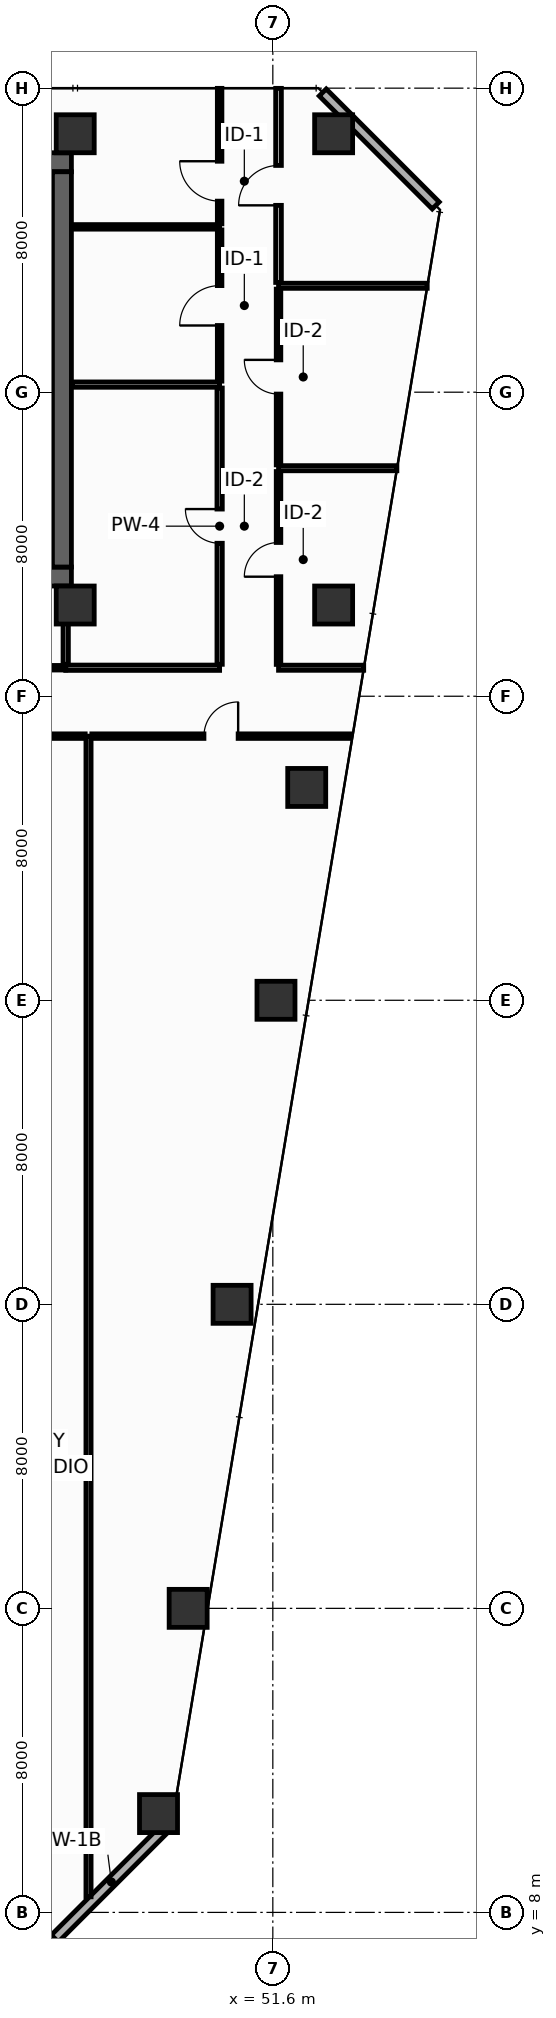
"""IFC4 building model, lengths in metres.
Left out: names, types, materials, properties, quantities, classifications, styles, units other than length and angle.
Written with IfcOpenShell. Run it as: python <this file> out.ifc"""

import sys

from ifc_helpers import new_model, si_unit, direction, frame, frame_2d, origin, origin_2d, place, context, subcontext, project, spatial, rectangle, hollow_rectangle, extrude, element, fill, save


model = new_model("IFC4")
c1 = context("Model", 3, precision=1e-05, world=origin(), true_north=direction((0.0, 1.0)))
c2 = subcontext(c1, "Body", "Model", "MODEL_VIEW")
j1 = project(units=[si_unit("LENGTHUNIT", "METRE"), si_unit("PLANEANGLEUNIT", "RADIAN")], contexts=[c1])
p1 = place(None, origin())
s1 = spatial("IfcSite", under=j1, at=p1, CompositionType="ELEMENT")
p2 = place(p1, origin())
s2 = spatial("IfcBuilding", under=s1, at=p2, CompositionType="ELEMENT")
p3 = place(p2, frame((0.0, 0.0, 137.2)))
s3 = spatial("IfcBuildingStorey", under=s2, at=p3, CompositionType="ELEMENT", Elevation=137.2)
p4 = place(p3, frame((13.6, 43.15, 0.0), z_axis=(0.0, 0.0, 1.0), x_axis=(1.0, 0.0, 0.0)))
e1 = element("IfcWall", 1, at=p4, inside=s3, PredefinedType="SHEAR", context=c2, shape_type="SweptSolid", body=[
    extrude(rectangle(XDim=32.7, YDim=0.5, at=frame_2d((16.35, 0.0))), origin(), (0.0, 0.0, 1.0), 3.55),
])
p5 = place(p4, frame((5.4, 0.0, 0.0)))
e2 = element("IfcOpeningElement", 2, at=p5, cuts=e1, PredefinedType="OPENING", context=c2, shape_type="SweptSolid", body=[
    extrude(rectangle(XDim=1.1, YDim=2.15, at=frame_2d((0.55, 1.075))), frame((0.0, 0.26, 0.0), z_axis=(0.0, -1.0, 0.0), x_axis=(1.0, 0.0, 0.0)), (0.0, 0.0, 1.0), 0.52),
])
p6 = place(p4, frame((25.6, 0.0, 0.0)))
e3 = element("IfcOpeningElement", 3, at=p6, cuts=e1, PredefinedType="OPENING", context=c2, shape_type="SweptSolid", body=[
    extrude(rectangle(XDim=1.1, YDim=2.15, at=frame_2d((0.55, 1.075))), frame((0.0, 0.26, 0.0), z_axis=(0.0, -1.0, 0.0), x_axis=(1.0, 0.0, 0.0)), (0.0, 0.0, 1.0), 0.52),
])
p7 = place(p3, frame((13.6, 54.05, 0.0), z_axis=(0.0, 0.0, 1.0), x_axis=(1.0, 0.0, 0.0)))
e4 = element("IfcWall", 4, at=p7, inside=s3, PredefinedType="SHEAR", context=c2, shape_type="SweptSolid", body=[
    extrude(rectangle(XDim=32.7, YDim=0.5, at=frame_2d((16.35, 0.0))), origin(), (0.0, 0.0, 1.0), 3.55),
])
p8 = place(p3, frame((46.05, 43.4, 0.0), z_axis=(0.0, 0.0, 1.0), x_axis=(0.0, 1.0, 0.0)))
e5 = element("IfcWall", 5, at=p8, inside=s3, PredefinedType="SHEAR", context=c2, shape_type="SweptSolid", body=[
    extrude(rectangle(XDim=10.4, YDim=0.5, at=frame_2d((5.2, 0.0))), origin(), (0.0, 0.0, 1.0), 3.55),
])
for number, where, z_axis, x_axis in (
    (6, (46.4, 54.8, 0.0), (0.0, 0.0, 1.0), (1.0, 0.0, 0.0)),
    (7, (53.2, 54.8, 0.0), (0.0, 0.0, 1.0), (1.0, 0.0, 0.0)),
    (8, (46.4, 42.4, 0.0), (0.0, 0.0, 1.0), (1.0, 0.0, 0.0)),
    (9, (53.2, 42.4, 0.0), (0.0, 0.0, 1.0), (1.0, 0.0, 0.0)),
    (10, (48.592, 10.6, 0.0), (0.0, 0.0, 1.0), (1.0, 0.0, 0.0)),
    (11, (49.372, 16.0, 0.0), (0.0, 0.0, 1.0), (1.0, 0.0, 0.0)),
    (12, (50.528, 24.0, 0.0), (0.0, 0.0, 1.0), (1.0, 0.0, 0.0)),
    (13, (51.683, 32.0, 0.0), (0.0, 0.0, 1.0), (1.0, 0.0, 0.0)),
    (14, (52.492, 37.6, 0.0), (0.0, 0.0, 1.0), (1.0, 0.0, 0.0)),
):
    element("IfcColumn", number, at=place(p3, frame(where, z_axis=z_axis, x_axis=x_axis)), inside=s3, PredefinedType="COLUMN", context=c2, shape_type="SweptSolid", body=[
        extrude(hollow_rectangle(XDim=1.0, YDim=1.0, WallThickness=0.045, at=origin_2d()), origin(), (0.0, 0.0, 1.0), 3.8),
    ])
p9 = place(p3, frame((45.864, 7.313, 0.0), z_axis=(0.0, 0.0, 1.0), x_axis=(0.70707775441, 0.707135806771, 0.0)))
e15 = element("IfcWall", 15, at=p9, inside=s3, PredefinedType="STANDARD", context=c2, shape_type="SweptSolid", body=[
    extrude(rectangle(XDim=4.206, YDim=0.26, at=frame_2d((2.103, 0.0))), origin(), (0.0, 0.0, 1.0), 3.55),
])
p10 = place(p3, frame((55.887, 52.913, 0.0), z_axis=(0.0, 0.0, 1.0), x_axis=(-0.707106781187, 0.707106781187, 0.0)))
e16 = element("IfcWall", 16, at=p10, inside=s3, PredefinedType="STANDARD", context=c2, shape_type="SweptSolid", body=[
    extrude(rectangle(XDim=4.206, YDim=0.26, at=frame_2d((2.103, 0.0))), origin(), (0.0, 0.0, 1.0), 3.55),
])
p11 = place(p3, frame((46.15, 40.75, 0.0), z_axis=(0.0, 0.0, 1.0), x_axis=(1.0, 0.0, 0.0)))
e17 = element("IfcWall", 17, at=p11, inside=s3, PredefinedType="PARTITIONING", context=c2, shape_type="SweptSolid", body=[
    extrude(rectangle(XDim=4.05, YDim=0.14, at=frame_2d((2.025, 0.0))), origin(), (0.0, 0.0, 1.0), 3.55),
])
p12 = place(p3, frame((46.15, 40.84, 0.0), z_axis=(0.0, 0.0, 1.0), x_axis=(0.0, 1.0, 0.0)))
e18 = element("IfcWall", 18, at=p12, inside=s3, PredefinedType="PARTITIONING", context=c2, shape_type="SweptSolid", body=[
    extrude(rectangle(XDim=2.04, YDim=0.14, at=frame_2d((1.02, 0.0))), origin(), (0.0, 0.0, 1.0), 3.55),
])
p13 = place(p3, frame((46.32, 48.2, 0.0), z_axis=(0.0, 0.0, 1.0), x_axis=(1.0, 0.0, 0.0)))
e19 = element("IfcWall", 19, at=p13, inside=s3, PredefinedType="PARTITIONING", context=c2, shape_type="SweptSolid", body=[
    extrude(rectangle(XDim=3.88, YDim=0.14, at=frame_2d((1.94, 0.0))), origin(), (0.0, 0.0, 1.0), 3.55),
])
p14 = place(p3, frame((50.2, 40.84, 0.0), z_axis=(0.0, 0.0, 1.0), x_axis=(0.0, 1.0, 0.0)))
e20 = element("IfcWall", 20, at=p14, inside=s3, PredefinedType="PARTITIONING", context=c2, shape_type="SweptSolid", body=[
    extrude(rectangle(XDim=7.27, YDim=0.14, at=frame_2d((3.635, 0.0))), origin(), (0.0, 0.0, 1.0), 2.835),
])
p15 = place(p14, frame((3.185, 0.0, 0.0)))
e21 = element("IfcOpeningElement", 21, at=p15, cuts=e20, PredefinedType="OPENING", context=c2, shape_type="SweptSolid", body=[
    extrude(rectangle(XDim=0.9, YDim=2.1, at=frame_2d((0.45, 1.05))), frame((0.0, 0.08, 0.0), z_axis=(0.0, -1.0, 0.0), x_axis=(1.0, 0.0, 0.0)), (0.0, 0.0, 1.0), 0.16),
])
p16 = place(p3, frame((46.32, 52.35, 0.0), z_axis=(0.0, 0.0, 1.0), x_axis=(1.0, 0.0, 0.0)))
e22 = element("IfcWall", 22, at=p16, inside=s3, PredefinedType="PARTITIONING", context=c2, shape_type="SweptSolid", body=[
    extrude(rectangle(XDim=3.88, YDim=0.12, at=frame_2d((1.94, 0.0))), origin(), (0.0, 0.0, 1.0), 3.55),
])
p17 = place(p3, frame((50.2, 48.29, 0.0), z_axis=(0.0, 0.0, 1.0), x_axis=(0.0, 1.0, 0.0)))
e23 = element("IfcWall", 23, at=p17, inside=s3, PredefinedType="PARTITIONING", context=c2, shape_type="SweptSolid", body=[
    extrude(rectangle(XDim=3.98, YDim=0.12, at=frame_2d((1.99, 0.0))), origin(), (0.0, 0.0, 1.0), 3.55),
])
p18 = place(p17, frame((1.465, 0.0, 0.0)))
e24 = element("IfcOpeningElement", 24, at=p18, cuts=e23, PredefinedType="OPENING", context=c2, shape_type="SweptSolid", body=[
    extrude(rectangle(XDim=1.05, YDim=2.15, at=frame_2d((0.525, 1.075))), frame((0.0, 0.07, 0.0), z_axis=(0.0, -1.0, 0.0), x_axis=(1.0, 0.0, 0.0)), (0.0, 0.0, 1.0), 0.14),
])
p19 = place(p3, frame((50.2, 52.43, 0.0), z_axis=(0.0, 0.0, 1.0), x_axis=(0.0, 1.0, 0.0)))
e25 = element("IfcWall", 25, at=p19, inside=s3, PredefinedType="PARTITIONING", context=c2, shape_type="SweptSolid", body=[
    extrude(rectangle(XDim=3.565, YDim=0.12, at=frame_2d((1.783, 0.0))), origin(), (0.0, 0.0, 1.0), 2.935),
])
p20 = place(p19, frame((0.597, 0.0, 0.0)))
e26 = element("IfcOpeningElement", 26, at=p20, cuts=e25, PredefinedType="OPENING", context=c2, shape_type="SweptSolid", body=[
    extrude(rectangle(XDim=1.05, YDim=2.15, at=frame_2d((0.525, 1.075))), frame((0.0, 0.07, 0.0), z_axis=(0.0, -1.0, 0.0), x_axis=(1.0, 0.0, 0.0)), (0.0, 0.0, 1.0), 0.14),
])
p21 = place(p3, frame((51.75, 40.75, 0.0), z_axis=(0.0, 0.0, 1.0), x_axis=(1.0, 0.0, 0.0)))
e27 = element("IfcWall", 27, at=p21, inside=s3, PredefinedType="PARTITIONING", context=c2, shape_type="SweptSolid", body=[
    extrude(rectangle(XDim=2.242, YDim=0.135, at=frame_2d((1.121, 0.0))), origin(), (0.0, 0.0, 1.0), 3.035),
])
p22 = place(p3, frame((51.75, 46.0, 0.0), z_axis=(0.0, 0.0, 1.0), x_axis=(1.0, 0.0, 0.0)))
e28 = element("IfcWall", 28, at=p22, inside=s3, PredefinedType="PARTITIONING", context=c2, shape_type="SweptSolid", body=[
    extrude(rectangle(XDim=3.115, YDim=0.135, at=frame_2d((1.557, 0.0))), origin(), (0.0, 0.0, 1.0), 2.835),
])
p23 = place(p3, frame((51.75, 50.8, 0.0), z_axis=(0.0, 0.0, 1.0), x_axis=(1.0, 0.0, 0.0)))
e29 = element("IfcWall", 29, at=p23, inside=s3, PredefinedType="PARTITIONING", context=c2, shape_type="SweptSolid", body=[
    extrude(rectangle(XDim=3.912, YDim=0.135, at=frame_2d((1.956, 0.0))), origin(), (0.0, 0.0, 1.0), 2.835),
])
p24 = place(p3, frame((51.75, 40.837, 0.0), z_axis=(0.0, 0.0, 1.0), x_axis=(0.0, 1.0, 0.0)))
e30 = element("IfcWall", 30, at=p24, inside=s3, PredefinedType="PARTITIONING", context=c2, shape_type="SweptSolid", body=[
    extrude(rectangle(XDim=5.075, YDim=0.12, at=frame_2d((2.538, 0.0))), origin(), (0.0, 0.0, 1.0), 2.835),
])
p25 = place(p24, frame((2.308, 0.0, 0.0)))
e31 = element("IfcOpeningElement", 31, at=p25, cuts=e30, PredefinedType="OPENING", context=c2, shape_type="SweptSolid", body=[
    extrude(rectangle(XDim=0.9, YDim=2.1, at=frame_2d((0.45, 1.05))), frame((0.0, 0.07, 0.0), z_axis=(0.0, -1.0, 0.0), x_axis=(1.0, 0.0, 0.0)), (0.0, 0.0, 1.0), 0.14),
])
p26 = place(p3, frame((51.75, 46.087, 0.0), z_axis=(0.0, 0.0, 1.0), x_axis=(0.0, 1.0, 0.0)))
e32 = element("IfcWall", 32, at=p26, inside=s3, PredefinedType="PARTITIONING", context=c2, shape_type="SweptSolid", body=[
    extrude(rectangle(XDim=4.625, YDim=0.12, at=frame_2d((2.312, 0.0))), origin(), (0.0, 0.0, 1.0), 3.55),
])
p27 = place(p26, frame((1.863, 0.0, 0.0)))
e33 = element("IfcOpeningElement", 33, at=p27, cuts=e32, PredefinedType="OPENING", context=c2, shape_type="SweptSolid", body=[
    extrude(rectangle(XDim=0.9, YDim=2.1, at=frame_2d((0.45, 1.05))), frame((0.0, 0.07, 0.0), z_axis=(0.0, -1.0, 0.0), x_axis=(1.0, 0.0, 0.0)), (0.0, 0.0, 1.0), 0.14),
])
p28 = place(p3, frame((51.75, 50.887, 0.0), z_axis=(0.0, 0.0, 1.0), x_axis=(0.0, 1.0, 0.0)))
e34 = element("IfcWall", 34, at=p28, inside=s3, PredefinedType="PARTITIONING", context=c2, shape_type="SweptSolid", body=[
    extrude(rectangle(XDim=5.108, YDim=0.15, at=frame_2d((2.554, 0.0))), origin(), (0.0, 0.0, 1.0), 2.935),
])
p29 = place(p28, frame((2.029, 0.0, 0.0)))
e35 = element("IfcOpeningElement", 35, at=p29, cuts=e34, PredefinedType="OPENING", context=c2, shape_type="SweptSolid", body=[
    extrude(rectangle(XDim=1.05, YDim=2.15, at=frame_2d((0.525, 1.075))), frame((0.0, 0.085, 0.0), z_axis=(0.0, -1.0, 0.0), x_axis=(1.0, 0.0, 0.0)), (0.0, 0.0, 1.0), 0.17),
])
p30 = place(p3, frame((40.995, 40.75, 0.0), z_axis=(0.0, 0.0, 1.0), x_axis=(1.0, 0.0, 0.0)))
e36 = element("IfcWall", 36, at=p30, inside=s3, PredefinedType="PARTITIONING", context=c2, shape_type="SweptSolid", body=[
    extrude(rectangle(XDim=5.155, YDim=0.12, at=frame_2d((2.577, 0.0))), origin(), (0.0, 0.0, 1.0), 3.55),
])
p31 = place(p30, frame((2.128, 0.0, 0.0)))
e37 = element("IfcOpeningElement", 37, at=p31, cuts=e36, PredefinedType="OPENING", context=c2, shape_type="SweptSolid", body=[
    extrude(rectangle(XDim=0.9, YDim=2.1, at=frame_2d((0.45, 1.05))), frame((0.0, 0.07, 0.0), z_axis=(0.0, -1.0, 0.0), x_axis=(1.0, 0.0, 0.0)), (0.0, 0.0, 1.0), 0.14),
])
p32 = place(p3, frame((46.75, 8.411, 0.0), z_axis=(0.0, 0.0, 1.0), x_axis=(0.0, 1.0, 0.0)))
e38 = element("IfcWall", 38, at=p32, inside=s3, PredefinedType="PARTITIONING", context=c2, shape_type="SweptSolid", body=[
    extrude(rectangle(XDim=30.539, YDim=0.135, at=frame_2d((15.27, 0.0))), origin(), (0.0, 0.0, 1.0), 2.835),
])
p33 = place(p3, frame((41.107, 38.95, 0.0), z_axis=(0.0, 0.0, 1.0), x_axis=(1.0, 0.0, 0.0)))
e39 = element("IfcWall", 39, at=p33, inside=s3, PredefinedType="PARTITIONING", context=c2, shape_type="SweptSolid", body=[
    extrude(rectangle(XDim=5.555, YDim=0.12, at=frame_2d((2.778, 0.0))), origin(), (0.0, 0.0, 1.0), 3.55),
])
p34 = place(p33, frame((2.327, 0.0, 0.0)))
e40 = element("IfcOpeningElement", 40, at=p34, cuts=e39, PredefinedType="OPENING", context=c2, shape_type="SweptSolid", body=[
    extrude(rectangle(XDim=0.9, YDim=2.1, at=frame_2d((0.45, 1.05))), frame((0.0, 0.07, 0.0), z_axis=(0.0, -1.0, 0.0), x_axis=(1.0, 0.0, 0.0)), (0.0, 0.0, 1.0), 0.14),
])
p35 = place(p3, frame((46.837, 38.95, 0.0), z_axis=(0.0, 0.0, 1.0), x_axis=(1.0, 0.0, 0.0)))
e41 = element("IfcWall", 41, at=p35, inside=s3, PredefinedType="PARTITIONING", context=c2, shape_type="SweptSolid", body=[
    extrude(rectangle(XDim=6.8, YDim=0.12, at=frame_2d((3.4, 0.0))), origin(), (0.0, 0.0, 1.0), 3.035),
])
p36 = place(p35, frame((2.95, 0.0, 0.0)))
e42 = element("IfcOpeningElement", 42, at=p36, cuts=e41, PredefinedType="OPENING", context=c2, shape_type="SweptSolid", body=[
    extrude(rectangle(XDim=0.9, YDim=2.1, at=frame_2d((0.45, 1.05))), frame((0.0, 0.07, 0.0), z_axis=(0.0, -1.0, 0.0), x_axis=(1.0, 0.0, 0.0)), (0.0, 0.0, 1.0), 0.14),
])
p37 = place(p15, origin())
e43 = element("IfcDoor", 43, at=p37, inside=s3, OperationType="SINGLE_SWING_RIGHT", PredefinedType="DOOR", context=c2, shape_type="SweptSolid", body=[
    extrude(rectangle(XDim=0.9, YDim=2.1, at=frame_2d((0.45, 1.05))), frame((0.0, 0.025, 0.0), z_axis=(0.0, -1.0, 0.0), x_axis=(1.0, 0.0, 0.0)), (0.0, 0.0, 1.0), 0.05),
])
fill(e21, e43)
p38 = place(p18, origin())
e44 = element("IfcDoor", 44, at=p38, inside=s3, OperationType="SINGLE_SWING_LEFT", PredefinedType="DOOR", context=c2, shape_type="SweptSolid", body=[
    extrude(rectangle(XDim=1.05, YDim=2.15, at=frame_2d((0.525, 1.075))), frame((0.0, 0.025, 0.0), z_axis=(0.0, -1.0, 0.0), x_axis=(1.0, 0.0, 0.0)), (0.0, 0.0, 1.0), 0.05),
])
fill(e24, e44)
p39 = place(p20, origin())
e45 = element("IfcDoor", 45, at=p39, inside=s3, OperationType="SINGLE_SWING_RIGHT", PredefinedType="DOOR", context=c2, shape_type="SweptSolid", body=[
    extrude(rectangle(XDim=1.05, YDim=2.15, at=frame_2d((0.525, 1.075))), frame((0.0, 0.025, 0.0), z_axis=(0.0, -1.0, 0.0), x_axis=(1.0, 0.0, 0.0)), (0.0, 0.0, 1.0), 0.05),
])
fill(e26, e45)
p40 = place(p25, origin())
e46 = element("IfcDoor", 46, at=p40, inside=s3, OperationType="SINGLE_SWING_LEFT", PredefinedType="DOOR", context=c2, shape_type="SweptSolid", body=[
    extrude(rectangle(XDim=0.9, YDim=2.1, at=frame_2d((0.45, 1.05))), frame((0.0, 0.025, 0.0), z_axis=(0.0, -1.0, 0.0), x_axis=(1.0, 0.0, 0.0)), (0.0, 0.0, 1.0), 0.05),
])
fill(e31, e46)
p41 = place(p27, origin())
e47 = element("IfcDoor", 47, at=p41, inside=s3, OperationType="SINGLE_SWING_RIGHT", PredefinedType="DOOR", context=c2, shape_type="SweptSolid", body=[
    extrude(rectangle(XDim=0.9, YDim=2.1, at=frame_2d((0.45, 1.05))), frame((0.0, 0.025, 0.0), z_axis=(0.0, -1.0, 0.0), x_axis=(1.0, 0.0, 0.0)), (0.0, 0.0, 1.0), 0.05),
])
fill(e33, e47)
p42 = place(p29, origin())
e48 = element("IfcDoor", 48, at=p42, inside=s3, OperationType="SINGLE_SWING_LEFT", PredefinedType="DOOR", context=c2, shape_type="SweptSolid", body=[
    extrude(rectangle(XDim=1.05, YDim=2.15, at=frame_2d((0.525, 1.075))), frame((0.0, 0.025, 0.0), z_axis=(0.0, -1.0, 0.0), x_axis=(1.0, 0.0, 0.0)), (0.0, 0.0, 1.0), 0.05),
])
fill(e35, e48)
p43 = place(p36, origin())
e49 = element("IfcDoor", 49, at=p43, inside=s3, OperationType="SINGLE_SWING_RIGHT", PredefinedType="DOOR", context=c2, shape_type="SweptSolid", body=[
    extrude(rectangle(XDim=0.9, YDim=2.1, at=frame_2d((0.45, 1.05))), frame((0.0, 0.025, 0.0), z_axis=(0.0, -1.0, 0.0), x_axis=(1.0, 0.0, 0.0)), (0.0, 0.0, 1.0), 0.05),
])
fill(e42, e49)
save(model, sys.argv[1])
